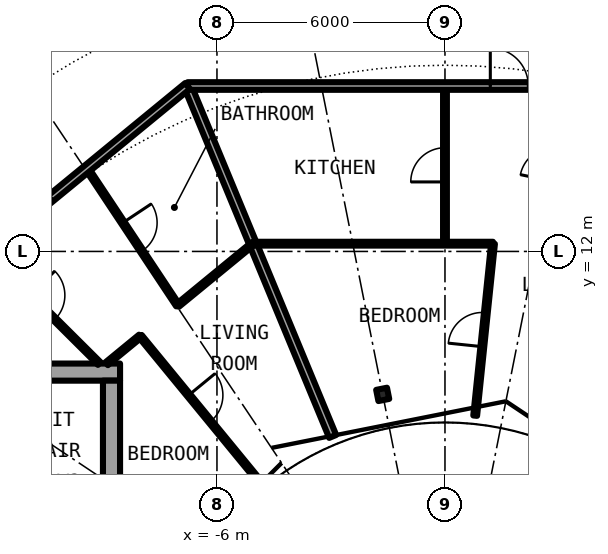
"""IFC4 building model, lengths in metres.
Left out: names, types, materials, properties, quantities, classifications, styles, units other than length and angle.
Written with IfcOpenShell. Run it as: python <this file> out.ifc"""

import sys

from ifc_helpers import new_model, si_unit, direction, frame, frame_2d, origin, origin_2d, place, context, subcontext, project, spatial, rectangle, i_section, extrude, element, fill, save


model = new_model("IFC4")
c1 = context("Model", 3, precision=1e-05, world=origin(), true_north=direction((0.0, 1.0)))
c2 = subcontext(c1, "Body", "Model", "MODEL_VIEW")
j1 = project(units=[si_unit("LENGTHUNIT", "METRE"), si_unit("PLANEANGLEUNIT", "RADIAN")], contexts=[c1])
p1 = place(None, origin())
s1 = spatial("IfcSite", under=j1, at=p1, CompositionType="ELEMENT")
p2 = place(p1, origin())
s2 = spatial("IfcBuilding", under=s1, at=p2, CompositionType="ELEMENT")
p3 = place(p2, frame((0.0, 0.0, 212.7)))
s3 = spatial("IfcBuildingStorey", under=s2, at=p3, CompositionType="ELEMENT", Elevation=212.7)
p4 = place(p3, frame((-1.639, 8.239, 0.0), z_axis=(0.0, 0.0, 1.0), x_axis=(-0.195090322016, 0.980785280403, 0.0)))
e1 = element("IfcColumn", 1, at=p4, inside=s3, PredefinedType="COLUMN", context=c2, shape_type="SweptSolid", body=[
    extrude(i_section(OverallWidth=0.3, OverallDepth=0.29, WebThickness=0.009, FlangeThickness=0.014, FilletRadius=0.027, at=origin_2d()), origin(), (0.0, 0.0, 1.0), 3.05),
])
p5 = place(p3, frame((-8.55, 8.825, 0.0), z_axis=(0.0, 0.0, 1.0), x_axis=(-1.0, 0.0, 0.0)))
e2 = element("IfcWall", 2, at=p5, inside=s3, PredefinedType="SHEAR", context=c2, shape_type="SweptSolid", body=[
    extrude(rectangle(XDim=13.5, YDim=0.45, at=frame_2d((6.75, 0.0))), origin(), (0.0, 0.0, 1.0), 3.05),
])
p6 = place(p5, frame((11.325, 0.0, 0.0)))
e3 = element("IfcOpeningElement", 3, at=p6, cuts=e2, PredefinedType="OPENING", context=c2, shape_type="SweptSolid", body=[
    extrude(rectangle(XDim=1.2, YDim=2.3, at=frame_2d((0.6, 1.15))), frame((0.0, 0.235, 0.0), z_axis=(0.0, -1.0, 0.0), x_axis=(1.0, 0.0, 0.0)), (0.0, 0.0, 1.0), 0.47),
])
p7 = place(p3, frame((-8.775, 8.6, 0.0), z_axis=(0.0, 0.0, 1.0), x_axis=(0.0, -1.0, 0.0)))
e4 = element("IfcWall", 4, at=p7, inside=s3, PredefinedType="SHEAR", context=c2, shape_type="SweptSolid", body=[
    extrude(rectangle(XDim=17.2, YDim=0.45, at=frame_2d((8.6, 0.0))), origin(), (0.0, 0.0, 1.0), 3.05),
])
p8 = place(p7, frame((7.4, 0.0, 0.1)))
e5 = element("IfcOpeningElement", 5, at=p8, cuts=e4, PredefinedType="OPENING", context=c2, shape_type="SweptSolid", body=[
    extrude(rectangle(XDim=2.4, YDim=2.2, at=frame_2d((1.2, 1.1))), frame((0.0, 0.235, 0.0), z_axis=(0.0, -1.0, 0.0), x_axis=(1.0, 0.0, 0.0)), (0.0, 0.0, 1.0), 0.47),
])
p9 = place(p3, frame((-12.069, 12.007, 0.0), z_axis=(0.0, 0.0, 1.0), x_axis=(0.708909651863, -0.705299302067, 0.0)))
e6 = element("IfcWall", 6, at=p9, inside=s3, PredefinedType="PARTITIONING", context=c2, shape_type="SweptSolid", body=[
    extrude(rectangle(XDim=4.193, YDim=0.1, at=frame_2d((2.096, 0.0))), origin(), (0.0, 0.0, 1.0), 2.7),
])
p10 = place(p9, frame((1.646, 0.0, 0.0)))
e7 = element("IfcOpeningElement", 7, at=p10, cuts=e6, PredefinedType="OPENING", context=c2, shape_type="SweptSolid", body=[
    extrude(rectangle(XDim=0.9, YDim=2.3, at=frame_2d((0.45, 1.15))), frame((0.0, 0.06, 0.0), z_axis=(0.0, -1.0, 0.0), x_axis=(1.0, 0.0, 0.0)), (0.0, 0.0, 1.0), 0.12),
])
p11 = place(p3, frame((-9.421, 14.18, 0.0), z_axis=(0.0, 0.0, 1.0), x_axis=(0.553303732327, -0.832979579457, 0.0)))
e8 = element("IfcWall", 8, at=p11, inside=s3, PredefinedType="PARTITIONING", context=c2, shape_type="SweptSolid", body=[
    extrude(rectangle(XDim=4.319, YDim=0.1, at=frame_2d((2.16, 0.0))), origin(), (0.0, 0.0, 1.0), 2.7),
])
p12 = place(p11, frame((1.71, 0.0, 0.0)))
e9 = element("IfcOpeningElement", 9, at=p12, cuts=e8, PredefinedType="OPENING", context=c2, shape_type="SweptSolid", body=[
    extrude(rectangle(XDim=0.9, YDim=2.3, at=frame_2d((0.45, 1.15))), frame((0.0, 0.06, 0.0), z_axis=(0.0, -1.0, 0.0), x_axis=(1.0, 0.0, 0.0)), (0.0, 0.0, 1.0), 0.12),
])
p13 = place(p3, frame((-8.019, 9.771, 0.0), z_axis=(0.0, 0.0, 1.0), x_axis=(0.634401778971, -0.773003481776, 0.0)))
e10 = element("IfcWall", 10, at=p13, inside=s3, PredefinedType="PARTITIONING", context=c2, shape_type="SweptSolid", body=[
    extrude(rectangle(XDim=4.92, YDim=0.1, at=frame_2d((2.46, 0.0))), origin(), (0.0, 0.0, 1.0), 2.7),
])
p14 = place(p13, frame((2.01, 0.0, 0.0)))
e11 = element("IfcOpeningElement", 11, at=p14, cuts=e10, PredefinedType="OPENING", context=c2, shape_type="SweptSolid", body=[
    extrude(rectangle(XDim=0.9, YDim=2.3, at=frame_2d((0.45, 1.15))), frame((0.0, 0.06, 0.0), z_axis=(0.0, -1.0, 0.0), x_axis=(1.0, 0.0, 0.0)), (0.0, 0.0, 1.0), 0.12),
])
p15 = place(p3, frame((-6.773, 16.353, 0.0), z_axis=(0.0, 0.0, 1.0), x_axis=(0.382549125466, -0.923935152814, 0.0)))
e12 = element("IfcWall", 12, at=p15, inside=s3, PredefinedType="PARTITIONING", context=c2, shape_type="SweptSolid", body=[
    extrude(rectangle(XDim=9.98, YDim=0.2, at=frame_2d((4.99, 0.0))), origin(), (0.0, 0.0, 1.0), 2.7),
])
p16 = place(p3, frame((0.0, 12.204, 0.0), z_axis=(0.0, 0.0, 1.0), x_axis=(0.0, 1.0, 0.0)))
e13 = element("IfcWall", 13, at=p16, inside=s3, PredefinedType="PARTITIONING", context=c2, shape_type="SweptSolid", body=[
    extrude(rectangle(XDim=4.149, YDim=0.1, at=frame_2d((2.074, 0.0))), origin(), (0.0, 0.0, 1.0), 2.7),
])
p17 = place(p16, frame((1.625, 0.0, 0.0)))
e14 = element("IfcOpeningElement", 14, at=p17, cuts=e13, PredefinedType="OPENING", context=c2, shape_type="SweptSolid", body=[
    extrude(rectangle(XDim=0.9, YDim=2.3, at=frame_2d((0.45, 1.15))), frame((0.0, 0.06, 0.0), z_axis=(0.0, -1.0, 0.0), x_axis=(1.0, 0.0, 0.0)), (0.0, 0.0, 1.0), 0.12),
])
p18 = place(p3, frame((0.795, 7.679, 0.0), z_axis=(0.0, 0.0, 1.0), x_axis=(0.103089563582, 0.994672077561, 0.0)))
e15 = element("IfcWall", 15, at=p18, inside=s3, PredefinedType="PARTITIONING", context=c2, shape_type="SweptSolid", body=[
    extrude(rectangle(XDim=4.549, YDim=0.1, at=frame_2d((2.275, 0.0))), origin(), (0.0, 0.0, 1.0), 2.7),
])
p19 = place(p18, frame((1.825, 0.0, 0.0)))
e16 = element("IfcOpeningElement", 16, at=p19, cuts=e15, PredefinedType="OPENING", context=c2, shape_type="SweptSolid", body=[
    extrude(rectangle(XDim=0.9, YDim=2.3, at=frame_2d((0.45, 1.15))), frame((0.0, 0.06, 0.0), z_axis=(0.0, -1.0, 0.0), x_axis=(1.0, 0.0, 0.0)), (0.0, 0.0, 1.0), 0.12),
])
p20 = place(p3, frame((-5.055, 12.204, 0.0), z_axis=(0.0, 0.0, 1.0), x_axis=(1.0, 0.0, 0.0)))
e17 = element("IfcWall", 17, at=p20, inside=s3, PredefinedType="PARTITIONING", context=c2, shape_type="SweptSolid", body=[
    extrude(rectangle(XDim=6.319, YDim=0.1, at=frame_2d((3.159, 0.0))), origin(), (0.0, 0.0, 1.0), 2.7),
])
p21 = place(p3, frame((-8.902, 9.046, 0.0), z_axis=(0.0, 0.0, 1.0), x_axis=(0.772842270779, 0.63459815986, 0.0)))
e18 = element("IfcWall", 18, at=p21, inside=s3, PredefinedType="PARTITIONING", context=c2, shape_type="SweptSolid", body=[
    extrude(rectangle(XDim=1.143, YDim=0.1, at=frame_2d((0.571, 0.0))), origin(), (0.0, 0.0, 1.0), 2.7),
])
p22 = place(p3, frame((-7.033, 10.581, 0.0), z_axis=(0.0, 0.0, 1.0), x_axis=(0.772990508216, 0.634417586617, 0.0)))
e19 = element("IfcWall", 19, at=p22, inside=s3, PredefinedType="PARTITIONING", context=c2, shape_type="SweptSolid", body=[
    extrude(rectangle(XDim=2.556, YDim=0.1, at=frame_2d((1.278, 0.0))), origin(), (0.0, 0.0, 1.0), 2.7),
])
p23 = place(p3, frame((-6.773, 16.353, 0.0), z_axis=(0.0, 0.0, 1.0), x_axis=(1.0, 0.0, 0.0)))
e20 = element("IfcWall", 20, at=p23, inside=s3, PredefinedType="PARTITIONING", context=c2, shape_type="SweptSolid", body=[
    extrude(rectangle(XDim=13.546, YDim=0.2, at=frame_2d((6.773, 0.0))), origin(), (0.0, 0.0, 1.0), 2.7),
])
p24 = place(p23, frame((7.966, 0.0, 0.0)))
e21 = element("IfcOpeningElement", 21, at=p24, cuts=e20, PredefinedType="OPENING", context=c2, shape_type="SweptSolid", body=[
    extrude(rectangle(XDim=1.0, YDim=2.3, at=frame_2d((0.5, 1.15))), frame((0.0, 0.11, 0.0), z_axis=(0.0, -1.0, 0.0), x_axis=(1.0, 0.0, 0.0)), (0.0, 0.0, 1.0), 0.22),
])
p25 = place(p3, frame((-14.717, 9.834, 0.0), z_axis=(0.0, 0.0, 1.0), x_axis=(0.773034536097, 0.634363938131, 0.0)))
e22 = element("IfcWall", 22, at=p25, inside=s3, PredefinedType="PARTITIONING", context=c2, shape_type="SweptSolid", body=[
    extrude(rectangle(XDim=10.277, YDim=0.2, at=frame_2d((5.138, 0.0))), origin(), (0.0, 0.0, 1.0), 2.7),
])
p26 = place(p25, frame((4.638, 0.0, 0.0)))
e23 = element("IfcOpeningElement", 23, at=p26, cuts=e22, PredefinedType="OPENING", context=c2, shape_type="SweptSolid", body=[
    extrude(rectangle(XDim=1.0, YDim=2.3, at=frame_2d((0.5, 1.15))), frame((0.0, 0.11, 0.0), z_axis=(0.0, -1.0, 0.0), x_axis=(1.0, 0.0, 0.0)), (0.0, 0.0, 1.0), 0.22),
])
p27 = place(p24, origin())
e24 = element("IfcDoor", 24, at=p27, inside=s3, OperationType="SINGLE_SWING_RIGHT", PredefinedType="DOOR", context=c2, shape_type="SweptSolid", body=[
    extrude(rectangle(XDim=1.0, YDim=2.3, at=frame_2d((0.5, 1.15))), frame((0.0, 0.025, 0.0), z_axis=(0.0, -1.0, 0.0), x_axis=(1.0, 0.0, 0.0)), (0.0, 0.0, 1.0), 0.05),
])
fill(e21, e24)
p28 = place(p17, origin())
e25 = element("IfcDoor", 25, at=p28, inside=s3, OperationType="SINGLE_SWING_RIGHT", PredefinedType="DOOR", context=c2, shape_type="SweptSolid", body=[
    extrude(rectangle(XDim=0.9, YDim=2.3, at=frame_2d((0.45, 1.15))), frame((0.0, 0.025, 0.0), z_axis=(0.0, -1.0, 0.0), x_axis=(1.0, 0.0, 0.0)), (0.0, 0.0, 1.0), 0.05),
])
fill(e14, e25)
p29 = place(p19, origin())
e26 = element("IfcDoor", 26, at=p29, inside=s3, OperationType="SINGLE_SWING_RIGHT", PredefinedType="DOOR", context=c2, shape_type="SweptSolid", body=[
    extrude(rectangle(XDim=0.9, YDim=2.3, at=frame_2d((0.45, 1.15))), frame((0.0, 0.025, 0.0), z_axis=(0.0, -1.0, 0.0), x_axis=(1.0, 0.0, 0.0)), (0.0, 0.0, 1.0), 0.05),
])
fill(e16, e26)
p30 = place(p12, origin())
e27 = element("IfcDoor", 27, at=p30, inside=s3, OperationType="SINGLE_SWING_RIGHT", PredefinedType="DOOR", context=c2, shape_type="SweptSolid", body=[
    extrude(rectangle(XDim=0.9, YDim=2.3, at=frame_2d((0.45, 1.15))), frame((0.0, 0.025, 0.0), z_axis=(0.0, -1.0, 0.0), x_axis=(1.0, 0.0, 0.0)), (0.0, 0.0, 1.0), 0.05),
])
fill(e9, e27)
p31 = place(p10, origin())
e28 = element("IfcDoor", 28, at=p31, inside=s3, OperationType="SINGLE_SWING_RIGHT", PredefinedType="DOOR", context=c2, shape_type="SweptSolid", body=[
    extrude(rectangle(XDim=0.9, YDim=2.3, at=frame_2d((0.45, 1.15))), frame((0.0, 0.025, 0.0), z_axis=(0.0, -1.0, 0.0), x_axis=(1.0, 0.0, 0.0)), (0.0, 0.0, 1.0), 0.05),
])
fill(e7, e28)
p32 = place(p14, origin())
e29 = element("IfcDoor", 29, at=p32, inside=s3, OperationType="SINGLE_SWING_RIGHT", PredefinedType="DOOR", context=c2, shape_type="SweptSolid", body=[
    extrude(rectangle(XDim=0.9, YDim=2.3, at=frame_2d((0.45, 1.15))), frame((0.0, 0.025, 0.0), z_axis=(0.0, -1.0, 0.0), x_axis=(1.0, 0.0, 0.0)), (0.0, 0.0, 1.0), 0.05),
])
fill(e11, e29)
save(model, sys.argv[1])
